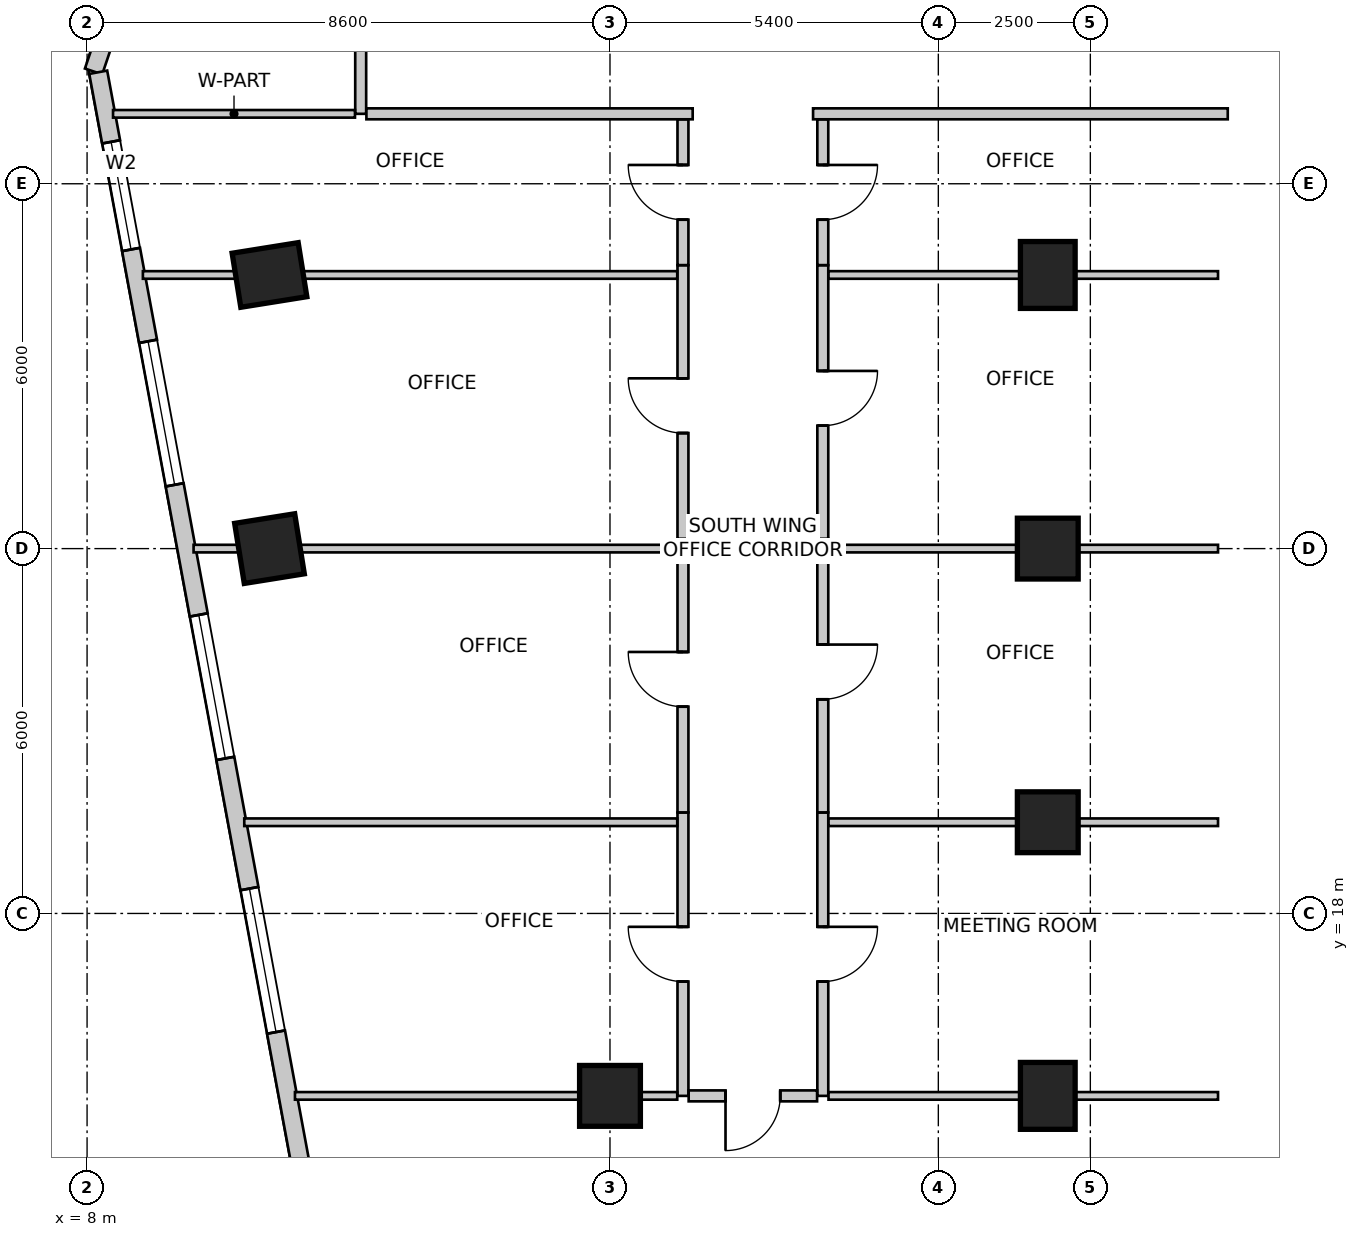
"""IFC4 building model, lengths in metres.
Left out: names, types, materials, properties, quantities, classifications, styles, units other than length and angle.
Written with IfcOpenShell. Run it as: python <this file> out.ifc"""

import sys

from ifc_helpers import new_model, si_unit, direction, frame, frame_2d, origin, origin_2d, place, context, subcontext, project, spatial, rectangle, extrude, source, transform, mapped, element, fill, save


model = new_model("IFC4")
c1 = context("Model", 3, precision=1e-05, world=origin(), true_north=direction((0.0, 1.0)))
c2 = subcontext(c1, "Body", "Model", "MODEL_VIEW")
j1 = project(units=[si_unit("LENGTHUNIT", "METRE"), si_unit("PLANEANGLEUNIT", "RADIAN")], contexts=[c1])
p1 = place(None, origin())
s1 = spatial("IfcSite", under=j1, at=p1, CompositionType="ELEMENT")
p2 = place(p1, origin())
s2 = spatial("IfcBuilding", under=s1, at=p2, CompositionType="ELEMENT")
p3 = place(p2, frame((0.0, 0.0, 51.0)))
s3 = spatial("IfcBuildingStorey", under=s2, at=p3, CompositionType="ELEMENT", Elevation=51.0)
m1 = source(origin(), c2, "Body", "SweptSolid", [
    extrude(rectangle(XDim=0.9, YDim=1.1, at=origin_2d()), origin(), (0.0, 0.0, 1.0), 4.0),
])
p4 = place(p3, frame((11.0, 28.5, 0.0), z_axis=(0.0, 0.0, 1.0), x_axis=(0.158158067254, -0.987413806751, 0.0)))
e1 = element("IfcColumn", 1, at=p4, inside=s3, PredefinedType="COLUMN", context=c2, shape_type="MappedRepresentation", body=[
    mapped(m1, transform((0.0, 0.0, 0.0), scale=1.0)),
])
m2 = source(origin(), c2, "Body", "SweptSolid", [
    extrude(rectangle(XDim=1.0, YDim=1.0, at=origin_2d()), origin(), (0.0, 0.0, 1.0), 4.0),
])
p5 = place(p3, frame((11.0, 24.0, 0.0), z_axis=(0.0, 0.0, 1.0), x_axis=(0.158158067254, -0.987413806751, 0.0)))
e2 = element("IfcColumn", 2, at=p5, inside=s3, PredefinedType="COLUMN", context=c2, shape_type="MappedRepresentation", body=[
    mapped(m2, transform((0.0, 0.0, 0.0), scale=1.0)),
])
p6 = place(p3, frame((23.8, 28.5, 0.0), z_axis=(0.0, 0.0, 1.0), x_axis=(1.0, 0.0, 0.0)))
e3 = element("IfcColumn", 3, at=p6, inside=s3, PredefinedType="COLUMN", context=c2, shape_type="MappedRepresentation", body=[
    mapped(m1, transform((0.0, 0.0, 0.0), scale=1.0)),
])
for number, where, z_axis, x_axis in (
    (4, (23.8, 24.0, 0.0), (0.0, 0.0, 1.0), (1.0, 0.0, 0.0)),
    (5, (23.8, 19.5, 0.0), (0.0, 0.0, 1.0), (1.0, 0.0, 0.0)),
):
    element("IfcColumn", number, at=place(p3, frame(where, z_axis=z_axis, x_axis=x_axis)), inside=s3, PredefinedType="COLUMN", context=c2, shape_type="MappedRepresentation", body=[
        mapped(m2, transform((0.0, 0.0, 0.0), scale=1.0)),
    ])
p7 = place(p3, frame((23.8, 15.0, 0.0), z_axis=(0.0, 0.0, 1.0), x_axis=(1.0, 0.0, 0.0)))
e6 = element("IfcColumn", 6, at=p7, inside=s3, PredefinedType="COLUMN", context=c2, shape_type="MappedRepresentation", body=[
    mapped(m1, transform((0.0, 0.0, 0.0), scale=1.0)),
])
p8 = place(p3, frame((16.6, 15.0, 0.0), z_axis=(0.0, 0.0, 1.0), x_axis=(1.0, 0.0, 0.0)))
e7 = element("IfcColumn", 7, at=p8, inside=s3, PredefinedType="COLUMN", context=c2, shape_type="MappedRepresentation", body=[
    mapped(m2, transform((0.0, 0.0, 0.0), scale=1.0)),
])
p9 = place(p3, frame((13.269, 47.134, 0.0), z_axis=(0.0, 0.0, 1.0), x_axis=(-0.319920423265, -0.947444416722, 0.0)))
e8 = element("IfcWall", 8, at=p9, inside=s3, PredefinedType="SOLIDWALL", context=c2, shape_type="SweptSolid", body=[
    extrude(rectangle(XDim=16.135, YDim=0.3, at=frame_2d((8.067, 0.0))), origin(), (0.0, 0.0, 1.0), 3.75),
])
m3 = source(origin(), c2, "Body", "SweptSolid", [
    extrude(rectangle(XDim=2.8, YDim=2.4, at=frame_2d((1.4, 1.2))), frame((0.0, 0.16, 0.0), z_axis=(0.0, -1.0, 0.0), x_axis=(1.0, 0.0, 0.0)), (0.0, 0.0, 1.0), 0.32),
])
p10 = place(p9, frame((1.988, 0.0, 0.85)))
e9 = element("IfcOpeningElement", 9, at=p10, cuts=e8, PredefinedType="OPENING", context=c2, shape_type="MappedRepresentation", body=[
    mapped(m3, transform((0.0, 0.0, 0.0), scale=1.0)),
])
m4 = source(origin(), c2, "Body", "SweptSolid", [
    extrude(rectangle(XDim=2.4, YDim=2.2, at=frame_2d((1.2, 1.1))), frame((0.0, 0.16, 0.0), z_axis=(0.0, -1.0, 0.0), x_axis=(1.0, 0.0, 0.0)), (0.0, 0.0, 1.0), 0.32),
])
p11 = place(p9, frame((7.159, 0.0, 0.85)))
e10 = element("IfcOpeningElement", 10, at=p11, cuts=e8, PredefinedType="OPENING", context=c2, shape_type="MappedRepresentation", body=[
    mapped(m4, transform((0.0, 0.0, 0.0), scale=1.0)),
])
p12 = place(p9, frame((11.93, 0.0, 0.85)))
e11 = element("IfcOpeningElement", 11, at=p12, cuts=e8, PredefinedType="OPENING", context=c2, shape_type="MappedRepresentation", body=[
    mapped(m3, transform((0.0, 0.0, 0.0), scale=1.0)),
])
p13 = place(p3, frame((8.183, 31.833, 0.0), z_axis=(0.0, 0.0, 1.0), x_axis=(0.18216364648, -0.983268226834, 0.0)))
e12 = element("IfcWall", 12, at=p13, inside=s3, PredefinedType="SOLIDWALL", context=c2, shape_type="SweptSolid", body=[
    extrude(rectangle(XDim=26.678, YDim=0.3, at=frame_2d((13.339, 0.0))), origin(), (0.0, 0.0, 1.0), 3.75),
])
m5 = source(origin(), c2, "Body", "SweptSolid", [
    extrude(rectangle(XDim=1.8, YDim=2.1, at=frame_2d((0.9, 1.05))), frame((0.0, 0.16, 0.0), z_axis=(0.0, -1.0, 0.0), x_axis=(1.0, 0.0, 0.0)), (0.0, 0.0, 1.0), 0.32),
])
p14 = place(p13, frame((1.164, 0.0, 0.85)))
e13 = element("IfcOpeningElement", 13, at=p14, cuts=e12, PredefinedType="OPENING", context=c2, shape_type="MappedRepresentation", body=[
    mapped(m5, transform((0.0, 0.0, 0.0), scale=1.0)),
])
p15 = place(p13, frame((4.5, 0.0, 0.85)))
e14 = element("IfcOpeningElement", 14, at=p15, cuts=e12, PredefinedType="OPENING", context=c2, shape_type="MappedRepresentation", body=[
    mapped(m4, transform((0.0, 0.0, 0.0), scale=1.0)),
])
p16 = place(p13, frame((9.076, 0.0, 0.85)))
e15 = element("IfcOpeningElement", 15, at=p16, cuts=e12, PredefinedType="OPENING", context=c2, shape_type="MappedRepresentation", body=[
    mapped(m4, transform((0.0, 0.0, 0.0), scale=1.0)),
])
p17 = place(p13, frame((13.653, 0.0, 0.85)))
e16 = element("IfcOpeningElement", 16, at=p17, cuts=e12, PredefinedType="OPENING", context=c2, shape_type="MappedRepresentation", body=[
    mapped(m4, transform((0.0, 0.0, 0.0), scale=1.0)),
])
p18 = place(p13, frame((18.411, 0.0, 0.85)))
e17 = element("IfcOpeningElement", 17, at=p18, cuts=e12, PredefinedType="OPENING", context=c2, shape_type="MappedRepresentation", body=[
    mapped(m4, transform((0.0, 0.0, 0.0), scale=1.0)),
])
p19 = place(p13, frame((22.709, 0.0, 0.85)))
e18 = element("IfcOpeningElement", 18, at=p19, cuts=e12, PredefinedType="OPENING", context=c2, shape_type="MappedRepresentation", body=[
    mapped(m3, transform((0.0, 0.0, 0.0), scale=1.0)),
])
p20 = place(p3, frame((12.5, 31.15, 0.0), z_axis=(0.0, 0.0, 1.0), x_axis=(0.0, 1.0, 0.0)))
e19 = element("IfcWall", 19, at=p20, inside=s3, PredefinedType="PARTITIONING", context=c2, shape_type="SweptSolid", body=[
    extrude(rectangle(XDim=2.2, YDim=0.18, at=frame_2d((1.1, 0.0))), origin(), (0.0, 0.0, 1.0), 3.335),
])
p21 = place(p3, frame((17.96, 31.15, 0.0), z_axis=(0.0, 0.0, 1.0), x_axis=(-1.0, 0.0, 0.0)))
e20 = element("IfcWall", 20, at=p21, inside=s3, PredefinedType="PARTITIONING", context=c2, shape_type="SweptSolid", body=[
    extrude(rectangle(XDim=5.366, YDim=0.18, at=frame_2d((2.683, 0.0))), origin(), (0.0, 0.0, 1.0), 3.335),
])
p22 = place(p3, frame((26.76, 31.15, 0.0), z_axis=(0.0, 0.0, 1.0), x_axis=(-1.0, 0.0, 0.0)))
e21 = element("IfcWall", 21, at=p22, inside=s3, PredefinedType="PARTITIONING", context=c2, shape_type="SweptSolid", body=[
    extrude(rectangle(XDim=6.82, YDim=0.18, at=frame_2d((3.41, 0.0))), origin(), (0.0, 0.0, 1.0), 3.335),
])
p23 = place(p3, frame((12.406, 31.15, 0.0), z_axis=(0.0, 0.0, 1.0), x_axis=(-1.0, 0.0, 0.0)))
e22 = element("IfcWall", 22, at=p23, inside=s3, PredefinedType="PARTITIONING", context=c2, shape_type="SweptSolid", body=[
    extrude(rectangle(XDim=3.979, YDim=0.125, at=frame_2d((1.99, 0.0))), origin(), (0.0, 0.0, 1.0), 2.892),
])
p24 = place(p3, frame((17.8, 15.0, 0.0), z_axis=(0.0, 0.0, 1.0), x_axis=(0.0, 1.0, 0.0)))
e23 = element("IfcWall", 23, at=p24, inside=s3, PredefinedType="PARTITIONING", context=c2, shape_type="SweptSolid", body=[
    extrude(rectangle(XDim=4.66, YDim=0.18, at=frame_2d((2.33, 0.0))), origin(), (0.0, 0.0, 1.0), 2.892),
])
m6 = source(origin(), c2, "Body", "SweptSolid", [
    extrude(rectangle(XDim=0.9, YDim=2.15, at=frame_2d((0.45, 1.075))), frame((0.0, 0.1, 0.0), z_axis=(0.0, -1.0, 0.0), x_axis=(1.0, 0.0, 0.0)), (0.0, 0.0, 1.0), 0.2),
])
p25 = place(p24, frame((1.88, 0.0, 0.0)))
e24 = element("IfcOpeningElement", 24, at=p25, cuts=e23, PredefinedType="OPENING", context=c2, shape_type="MappedRepresentation", body=[
    mapped(m6, transform((0.0, 0.0, 0.0), scale=1.0)),
])
p26 = place(p3, frame((20.1, 19.66, 0.0), z_axis=(0.0, 0.0, 1.0), x_axis=(0.0, -1.0, 0.0)))
e25 = element("IfcWall", 25, at=p26, inside=s3, PredefinedType="PARTITIONING", context=c2, shape_type="SweptSolid", body=[
    extrude(rectangle(XDim=4.66, YDim=0.18, at=frame_2d((2.33, 0.0))), origin(), (0.0, 0.0, 1.0), 2.892),
])
p27 = place(p26, frame((1.88, 0.0, 0.0)))
e26 = element("IfcOpeningElement", 26, at=p27, cuts=e25, PredefinedType="OPENING", context=c2, shape_type="MappedRepresentation", body=[
    mapped(m6, transform((0.0, 0.0, 0.0), scale=1.0)),
])
p28 = place(p3, frame((17.8, 19.662, 0.0), z_axis=(0.0, 0.0, 1.0), x_axis=(0.0, 1.0, 0.0)))
e27 = element("IfcWall", 27, at=p28, inside=s3, PredefinedType="PARTITIONING", context=c2, shape_type="SweptSolid", body=[
    extrude(rectangle(XDim=4.498, YDim=0.18, at=frame_2d((2.249, 0.0))), origin(), (0.0, 0.0, 1.0), 3.125),
])
p29 = place(p28, frame((1.738, 0.0, 0.0)))
e28 = element("IfcOpeningElement", 28, at=p29, cuts=e27, PredefinedType="OPENING", context=c2, shape_type="MappedRepresentation", body=[
    mapped(m6, transform((0.0, 0.0, 0.0), scale=1.0)),
])
p30 = place(p3, frame((20.1, 24.16, 0.0), z_axis=(0.0, 0.0, 1.0), x_axis=(0.0, -1.0, 0.0)))
e29 = element("IfcWall", 29, at=p30, inside=s3, PredefinedType="PARTITIONING", context=c2, shape_type="SweptSolid", body=[
    extrude(rectangle(XDim=4.498, YDim=0.18, at=frame_2d((2.249, 0.0))), origin(), (0.0, 0.0, 1.0), 3.125),
])
p31 = place(p30, frame((1.738, 0.0, 0.0)))
e30 = element("IfcOpeningElement", 30, at=p31, cuts=e29, PredefinedType="OPENING", context=c2, shape_type="MappedRepresentation", body=[
    mapped(m6, transform((0.0, 0.0, 0.0), scale=1.0)),
])
p32 = place(p3, frame((17.8, 24.162, 0.0), z_axis=(0.0, 0.0, 1.0), x_axis=(0.0, 1.0, 0.0)))
e31 = element("IfcWall", 31, at=p32, inside=s3, PredefinedType="PARTITIONING", context=c2, shape_type="SweptSolid", body=[
    extrude(rectangle(XDim=4.498, YDim=0.18, at=frame_2d((2.249, 0.0))), origin(), (0.0, 0.0, 1.0), 3.125),
])
p33 = place(p32, frame((1.738, 0.0, 0.0)))
e32 = element("IfcOpeningElement", 32, at=p33, cuts=e31, PredefinedType="OPENING", context=c2, shape_type="MappedRepresentation", body=[
    mapped(m6, transform((0.0, 0.0, 0.0), scale=1.0)),
])
p34 = place(p3, frame((20.1, 28.66, 0.0), z_axis=(0.0, 0.0, 1.0), x_axis=(0.0, -1.0, 0.0)))
e33 = element("IfcWall", 33, at=p34, inside=s3, PredefinedType="PARTITIONING", context=c2, shape_type="SweptSolid", body=[
    extrude(rectangle(XDim=4.498, YDim=0.18, at=frame_2d((2.249, 0.0))), origin(), (0.0, 0.0, 1.0), 3.125),
])
p35 = place(p34, frame((1.738, 0.0, 0.0)))
e34 = element("IfcOpeningElement", 34, at=p35, cuts=e33, PredefinedType="OPENING", context=c2, shape_type="MappedRepresentation", body=[
    mapped(m6, transform((0.0, 0.0, 0.0), scale=1.0)),
])
p36 = place(p3, frame((17.8, 28.662, 0.0), z_axis=(0.0, 0.0, 1.0), x_axis=(0.0, 1.0, 0.0)))
e35 = element("IfcWall", 35, at=p36, inside=s3, PredefinedType="PARTITIONING", context=c2, shape_type="SweptSolid", body=[
    extrude(rectangle(XDim=2.394, YDim=0.18, at=frame_2d((1.197, 0.0))), origin(), (0.0, 0.0, 1.0), 3.335),
])
p37 = place(p36, frame((0.747, 0.0, 0.0)))
e36 = element("IfcOpeningElement", 36, at=p37, cuts=e35, PredefinedType="OPENING", context=c2, shape_type="MappedRepresentation", body=[
    mapped(m6, transform((0.0, 0.0, 0.0), scale=1.0)),
])
p38 = place(p3, frame((20.1, 31.056, 0.0), z_axis=(0.0, 0.0, 1.0), x_axis=(0.0, -1.0, 0.0)))
e37 = element("IfcWall", 37, at=p38, inside=s3, PredefinedType="PARTITIONING", context=c2, shape_type="SweptSolid", body=[
    extrude(rectangle(XDim=2.394, YDim=0.18, at=frame_2d((1.197, 0.0))), origin(), (0.0, 0.0, 1.0), 3.335),
])
p39 = place(p38, frame((0.747, 0.0, 0.0)))
e38 = element("IfcOpeningElement", 38, at=p39, cuts=e37, PredefinedType="OPENING", context=c2, shape_type="MappedRepresentation", body=[
    mapped(m6, transform((0.0, 0.0, 0.0), scale=1.0)),
])
p40 = place(p3, frame((20.006, 15.0, 0.0), z_axis=(0.0, 0.0, 1.0), x_axis=(-1.0, 0.0, 0.0)))
e39 = element("IfcWall", 39, at=p40, inside=s3, PredefinedType="PARTITIONING", context=c2, shape_type="SweptSolid", body=[
    extrude(rectangle(XDim=2.112, YDim=0.18, at=frame_2d((1.056, 0.0))), origin(), (0.0, 0.0, 1.0), 2.892),
])
p41 = place(p40, frame((0.606, 0.0, 0.0)))
e40 = element("IfcOpeningElement", 40, at=p41, cuts=e39, PredefinedType="OPENING", context=c2, shape_type="MappedRepresentation", body=[
    mapped(m6, transform((0.0, 0.0, 0.0), scale=1.0)),
])
p42 = place(p3, frame((10.585, 19.5, 0.0), z_axis=(0.0, 0.0, 1.0), x_axis=(1.0, 0.0, 0.0)))
e41 = element("IfcWall", 41, at=p42, inside=s3, PredefinedType="PARTITIONING", context=c2, shape_type="SweptSolid", body=[
    extrude(rectangle(XDim=7.121, YDim=0.125, at=frame_2d((3.561, 0.0))), origin(), (0.0, 0.0, 1.0), 3.75),
])
p43 = place(p3, frame((17.706, 15.0, 0.0), z_axis=(0.0, 0.0, 1.0), x_axis=(-1.0, 0.0, 0.0)))
e42 = element("IfcWall", 42, at=p43, inside=s3, PredefinedType="PARTITIONING", context=c2, shape_type="SweptSolid", body=[
    extrude(rectangle(XDim=6.287, YDim=0.125, at=frame_2d((3.144, 0.0))), origin(), (0.0, 0.0, 1.0), 2.892),
])
for number, where, z_axis, x_axis in (
    (43, (20.194, 19.5, 0.0), (0.0, 0.0, 1.0), (1.0, 0.0, 0.0)),
    (44, (26.6, 15.0, 0.0), (0.0, 0.0, 1.0), (-1.0, 0.0, 0.0)),
):
    element("IfcWall", number, at=place(p3, frame(where, z_axis=z_axis, x_axis=x_axis)), inside=s3, PredefinedType="PARTITIONING", context=c2, shape_type="SweptSolid", body=[
        extrude(rectangle(XDim=6.406, YDim=0.125, at=frame_2d((3.203, 0.0))), origin(), (0.0, 0.0, 1.0), 2.892),
    ])
p44 = place(p3, frame((9.752, 24.0, 0.0), z_axis=(0.0, 0.0, 1.0), x_axis=(1.0, 0.0, 0.0)))
e45 = element("IfcWall", 45, at=p44, inside=s3, PredefinedType="PARTITIONING", context=c2, shape_type="SweptSolid", body=[
    extrude(rectangle(XDim=7.954, YDim=0.125, at=frame_2d((3.977, 0.0))), origin(), (0.0, 0.0, 1.0), 2.892),
])
p45 = place(p3, frame((20.194, 24.0, 0.0), z_axis=(0.0, 0.0, 1.0), x_axis=(1.0, 0.0, 0.0)))
e46 = element("IfcWall", 46, at=p45, inside=s3, PredefinedType="PARTITIONING", context=c2, shape_type="SweptSolid", body=[
    extrude(rectangle(XDim=6.406, YDim=0.125, at=frame_2d((3.203, 0.0))), origin(), (0.0, 0.0, 1.0), 2.892),
])
p46 = place(p3, frame((8.918, 28.5, 0.0), z_axis=(0.0, 0.0, 1.0), x_axis=(1.0, 0.0, 0.0)))
e47 = element("IfcWall", 47, at=p46, inside=s3, PredefinedType="PARTITIONING", context=c2, shape_type="SweptSolid", body=[
    extrude(rectangle(XDim=8.788, YDim=0.125, at=frame_2d((4.394, 0.0))), origin(), (0.0, 0.0, 1.0), 2.892),
])
p47 = place(p3, frame((20.194, 28.5, 0.0), z_axis=(0.0, 0.0, 1.0), x_axis=(1.0, 0.0, 0.0)))
e48 = element("IfcWall", 48, at=p47, inside=s3, PredefinedType="PARTITIONING", context=c2, shape_type="SweptSolid", body=[
    extrude(rectangle(XDim=6.406, YDim=0.125, at=frame_2d((3.203, 0.0))), origin(), (0.0, 0.0, 1.0), 2.892),
])
m7 = source(origin(), c2, "Body", "SweptSolid", [
    extrude(rectangle(XDim=1.8, YDim=2.1, at=frame_2d((0.9, 1.05))), frame((0.0, -0.015, 0.0), z_axis=(0.0, -1.0, 0.0), x_axis=(1.0, 0.0, 0.0)), (0.0, 0.0, 1.0), 0.06),
])
p48 = place(p14, origin())
e49 = element("IfcWindow", 49, at=p48, inside=s3, PartitioningType="SINGLE_PANEL", PredefinedType="WINDOW", context=c2, shape_type="MappedRepresentation", body=[
    mapped(m7, transform((0.0, 0.0, 0.0), scale=1.0)),
])
fill(e13, e49)
m8 = source(origin(), c2, "Body", "SweptSolid", [
    extrude(rectangle(XDim=2.4, YDim=2.2, at=frame_2d((1.2, 1.1))), frame((0.0, -0.015, 0.0), z_axis=(0.0, -1.0, 0.0), x_axis=(1.0, 0.0, 0.0)), (0.0, 0.0, 1.0), 0.06),
])
p49 = place(p15, origin())
e50 = element("IfcWindow", 50, at=p49, inside=s3, PartitioningType="SINGLE_PANEL", PredefinedType="WINDOW", context=c2, shape_type="MappedRepresentation", body=[
    mapped(m8, transform((0.0, 0.0, 0.0), scale=1.0)),
])
fill(e14, e50)
p50 = place(p16, origin())
e51 = element("IfcWindow", 51, at=p50, inside=s3, PartitioningType="SINGLE_PANEL", PredefinedType="WINDOW", context=c2, shape_type="MappedRepresentation", body=[
    mapped(m8, transform((0.0, 0.0, 0.0), scale=1.0)),
])
fill(e15, e51)
p51 = place(p17, origin())
e52 = element("IfcWindow", 52, at=p51, inside=s3, PartitioningType="SINGLE_PANEL", PredefinedType="WINDOW", context=c2, shape_type="MappedRepresentation", body=[
    mapped(m8, transform((0.0, 0.0, 0.0), scale=1.0)),
])
fill(e16, e52)
m9 = source(origin(), c2, "Body", "SweptSolid", [
    extrude(rectangle(XDim=0.9, YDim=2.15, at=frame_2d((0.45, 1.075))), frame((0.0, 0.025, 0.0), z_axis=(0.0, -1.0, 0.0), x_axis=(1.0, 0.0, 0.0)), (0.0, 0.0, 1.0), 0.05),
])
p52 = place(p25, origin())
e53 = element("IfcDoor", 53, at=p52, inside=s3, OperationType="SINGLE_SWING_RIGHT", PredefinedType="DOOR", context=c2, shape_type="MappedRepresentation", body=[
    mapped(m9, transform((0.0, 0.0, 0.0), scale=1.0)),
])
fill(e24, e53)
p53 = place(p27, origin())
e54 = element("IfcDoor", 54, at=p53, inside=s3, OperationType="SINGLE_SWING_LEFT", PredefinedType="DOOR", context=c2, shape_type="MappedRepresentation", body=[
    mapped(m9, transform((0.0, 0.0, 0.0), scale=1.0)),
])
fill(e26, e54)
p54 = place(p29, origin())
e55 = element("IfcDoor", 55, at=p54, inside=s3, OperationType="SINGLE_SWING_RIGHT", PredefinedType="DOOR", context=c2, shape_type="MappedRepresentation", body=[
    mapped(m9, transform((0.0, 0.0, 0.0), scale=1.0)),
])
fill(e28, e55)
p55 = place(p31, origin())
e56 = element("IfcDoor", 56, at=p55, inside=s3, OperationType="SINGLE_SWING_LEFT", PredefinedType="DOOR", context=c2, shape_type="MappedRepresentation", body=[
    mapped(m9, transform((0.0, 0.0, 0.0), scale=1.0)),
])
fill(e30, e56)
p56 = place(p33, origin())
e57 = element("IfcDoor", 57, at=p56, inside=s3, OperationType="SINGLE_SWING_RIGHT", PredefinedType="DOOR", context=c2, shape_type="MappedRepresentation", body=[
    mapped(m9, transform((0.0, 0.0, 0.0), scale=1.0)),
])
fill(e32, e57)
p57 = place(p35, origin())
e58 = element("IfcDoor", 58, at=p57, inside=s3, OperationType="SINGLE_SWING_LEFT", PredefinedType="DOOR", context=c2, shape_type="MappedRepresentation", body=[
    mapped(m9, transform((0.0, 0.0, 0.0), scale=1.0)),
])
fill(e34, e58)
p58 = place(p37, origin())
e59 = element("IfcDoor", 59, at=p58, inside=s3, OperationType="SINGLE_SWING_RIGHT", PredefinedType="DOOR", context=c2, shape_type="MappedRepresentation", body=[
    mapped(m9, transform((0.0, 0.0, 0.0), scale=1.0)),
])
fill(e36, e59)
p59 = place(p39, origin())
e60 = element("IfcDoor", 60, at=p59, inside=s3, OperationType="SINGLE_SWING_LEFT", PredefinedType="DOOR", context=c2, shape_type="MappedRepresentation", body=[
    mapped(m9, transform((0.0, 0.0, 0.0), scale=1.0)),
])
fill(e38, e60)
p60 = place(p41, origin())
e61 = element("IfcDoor", 61, at=p60, inside=s3, OperationType="SINGLE_SWING_RIGHT", PredefinedType="DOOR", context=c2, shape_type="MappedRepresentation", body=[
    mapped(m9, transform((0.0, 0.0, 0.0), scale=1.0)),
])
fill(e40, e61)
save(model, sys.argv[1])
